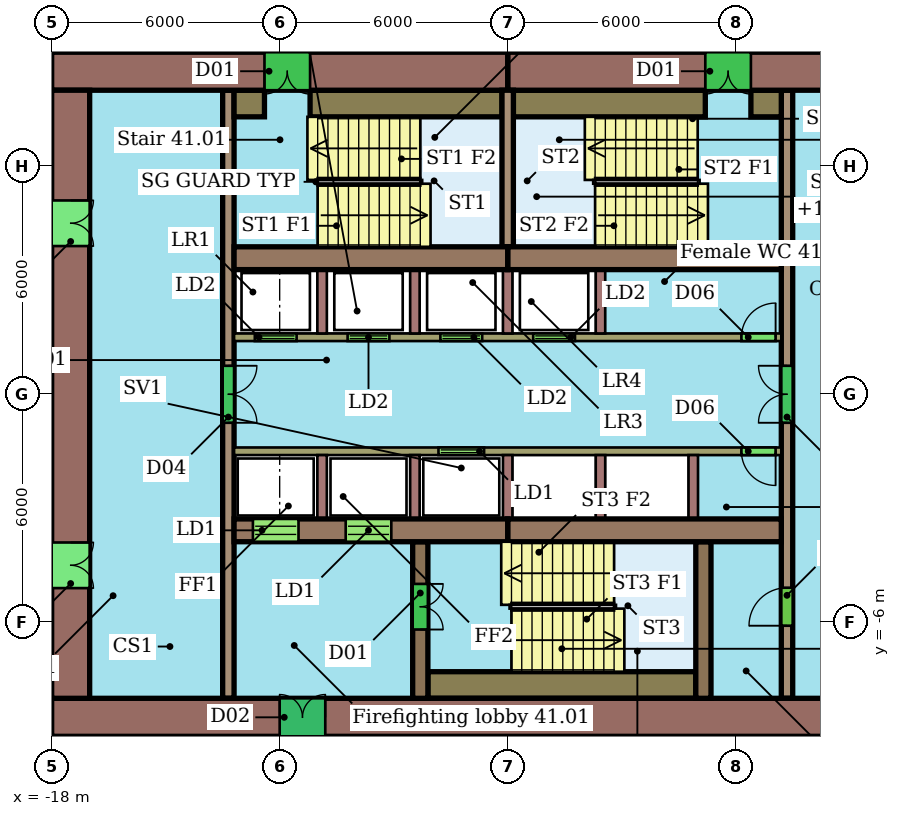
"""IFC4 building model, lengths in metres.
Left out: names, types, materials, properties, quantities, classifications, styles, units other than length and angle.
Written with IfcOpenShell. Run it as: python <this file> out.ifc"""

import sys

from ifc_helpers import new_model, si_unit, direction, frame, frame_2d, origin, place, context, subcontext, project, spatial, rectangle, extrude, element, fill, save


model = new_model("IFC4")
c1 = context("Model", 3, precision=1e-05, world=origin(), true_north=direction((0.0, 1.0)))
c2 = subcontext(c1, "Body", "Model", "MODEL_VIEW")
j1 = project(units=[si_unit("LENGTHUNIT", "METRE"), si_unit("PLANEANGLEUNIT", "RADIAN")], contexts=[c1])
p1 = place(None, origin())
s1 = spatial("IfcSite", under=j1, at=p1, CompositionType="ELEMENT")
p2 = place(p1, origin())
s2 = spatial("IfcBuilding", under=s1, at=p2, CompositionType="ELEMENT")
p3 = place(p2, frame((0.0, 0.0, 172.2)))
s3 = spatial("IfcBuildingStorey", under=s2, at=p3, CompositionType="ELEMENT", Elevation=172.2)
p4 = place(p3, frame((6.0, 8.5, 0.0), z_axis=(0.0, 0.0, 1.0), x_axis=(-1.0, 0.0, 0.0)))
e1 = element("IfcWall", 1, at=p4, inside=s3, PredefinedType="SHEAR", context=c2, shape_type="SweptSolid", body=[
    extrude(rectangle(XDim=12.0, YDim=1.0, at=frame_2d((6.0, 0.0))), origin(), (0.0, 0.0, 1.0), 3.3),
])
p5 = place(p4, frame((5.6, 0.0, 0.0)))
e2 = element("IfcOpeningElement", 2, at=p5, cuts=e1, PredefinedType="OPENING", context=c2, shape_type="SweptSolid", body=[
    extrude(rectangle(XDim=1.2, YDim=2.1, at=frame_2d((0.6, 1.05))), frame((0.0, 0.51, 0.0), z_axis=(0.0, -1.0, 0.0), x_axis=(1.0, 0.0, 0.0)), (0.0, 0.0, 1.0), 1.02),
])
p6 = place(p3, frame((-6.0, 8.5, 0.0), z_axis=(0.0, 0.0, 1.0), x_axis=(-1.0, 0.0, 0.0)))
e3 = element("IfcWall", 3, at=p6, inside=s3, PredefinedType="SHEAR", context=c2, shape_type="SweptSolid", body=[
    extrude(rectangle(XDim=12.0, YDim=1.0, at=frame_2d((6.0, 0.0))), origin(), (0.0, 0.0, 1.0), 3.3),
])
p7 = place(p6, frame((5.2, 0.0, 0.0)))
e4 = element("IfcOpeningElement", 4, at=p7, cuts=e3, PredefinedType="OPENING", context=c2, shape_type="SweptSolid", body=[
    extrude(rectangle(XDim=1.2, YDim=2.1, at=frame_2d((0.6, 1.05))), frame((0.0, 0.51, 0.0), z_axis=(0.0, -1.0, 0.0), x_axis=(1.0, 0.0, 0.0)), (0.0, 0.0, 1.0), 1.02),
])
p8 = place(p3, frame((-18.0, -8.5, 0.0), z_axis=(0.0, 0.0, 1.0), x_axis=(1.0, 0.0, 0.0)))
e5 = element("IfcWall", 5, at=p8, inside=s3, PredefinedType="SHEAR", context=c2, shape_type="SweptSolid", body=[
    extrude(rectangle(XDim=24.0, YDim=1.0, at=frame_2d((12.0, 0.0))), origin(), (0.0, 0.0, 1.0), 3.3),
])
p9 = place(p8, frame((6.0, 0.0, 0.0)))
e6 = element("IfcOpeningElement", 6, at=p9, cuts=e5, PredefinedType="OPENING", context=c2, shape_type="SweptSolid", body=[
    extrude(rectangle(XDim=1.2, YDim=2.1, at=frame_2d((0.6, 1.05))), frame((0.0, 0.51, 0.0), z_axis=(0.0, -1.0, 0.0), x_axis=(1.0, 0.0, 0.0)), (0.0, 0.0, 1.0), 1.02),
])
p10 = place(p3, frame((-17.5, 8.0, 0.0), z_axis=(0.0, 0.0, 1.0), x_axis=(0.0, -1.0, 0.0)))
e7 = element("IfcWall", 7, at=p10, inside=s3, PredefinedType="SHEAR", context=c2, shape_type="SweptSolid", body=[
    extrude(rectangle(XDim=16.0, YDim=1.0, at=frame_2d((8.0, 0.0))), origin(), (0.0, 0.0, 1.0), 3.3),
])
p11 = place(p10, frame((11.9, 0.0, 0.0)))
e8 = element("IfcOpeningElement", 8, at=p11, cuts=e7, PredefinedType="OPENING", context=c2, shape_type="SweptSolid", body=[
    extrude(rectangle(XDim=1.2, YDim=2.1, at=frame_2d((0.6, 1.05))), frame((0.0, 0.51, 0.0), z_axis=(0.0, -1.0, 0.0), x_axis=(1.0, 0.0, 0.0)), (0.0, 0.0, 1.0), 1.02),
])
p12 = place(p10, frame((2.9, 0.0, 0.0)))
e9 = element("IfcOpeningElement", 9, at=p12, cuts=e7, PredefinedType="OPENING", context=c2, shape_type="SweptSolid", body=[
    extrude(rectangle(XDim=1.2, YDim=2.1, at=frame_2d((0.6, 1.05))), frame((0.0, 0.51, 0.0), z_axis=(0.0, -1.0, 0.0), x_axis=(1.0, 0.0, 0.0)), (0.0, 0.0, 1.0), 1.02),
])
for number, where, z_axis, x_axis in (
    (10, (-13.2, 3.58, 0.0), (0.0, 0.0, 1.0), (1.0, 0.0, 0.0)),
    (11, (-6.0, 3.58, 0.0), (0.0, 0.0, 1.0), (1.0, 0.0, 0.0)),
):
    element("IfcWall", number, at=place(p3, frame(where, z_axis=z_axis, x_axis=x_axis)), inside=s3, PredefinedType="SHEAR", context=c2, shape_type="SweptSolid", body=[
        extrude(rectangle(XDim=7.2, YDim=0.6, at=frame_2d((3.6, 0.0))), origin(), (0.0, 0.0, 1.0), 3.3),
    ])
p13 = place(p3, frame((-13.2, -3.58, 0.0), z_axis=(0.0, 0.0, 1.0), x_axis=(1.0, 0.0, 0.0)))
e12 = element("IfcWall", 12, at=p13, inside=s3, PredefinedType="SHEAR", context=c2, shape_type="SweptSolid", body=[
    extrude(rectangle(XDim=7.2, YDim=0.6, at=frame_2d((3.6, 0.0))), origin(), (0.0, 0.0, 1.0), 3.3),
])
p14 = place(p13, frame((0.496, 0.0, 0.0)))
e13 = element("IfcOpeningElement", 13, at=p14, cuts=e12, PredefinedType="OPENING", context=c2, shape_type="SweptSolid", body=[
    extrude(rectangle(XDim=1.2, YDim=2.1, at=frame_2d((0.6, 1.05))), frame((0.0, 0.31, 0.0), z_axis=(0.0, -1.0, 0.0), x_axis=(1.0, 0.0, 0.0)), (0.0, 0.0, 1.0), 0.62),
])
p15 = place(p13, frame((2.938, 0.0, 0.0)))
e14 = element("IfcOpeningElement", 14, at=p15, cuts=e12, PredefinedType="OPENING", context=c2, shape_type="SweptSolid", body=[
    extrude(rectangle(XDim=1.2, YDim=2.1, at=frame_2d((0.6, 1.05))), frame((0.0, 0.31, 0.0), z_axis=(0.0, -1.0, 0.0), x_axis=(1.0, 0.0, 0.0)), (0.0, 0.0, 1.0), 0.62),
])
p16 = place(p3, frame((-6.0, -3.58, 0.0), z_axis=(0.0, 0.0, 1.0), x_axis=(1.0, 0.0, 0.0)))
e15 = element("IfcWall", 15, at=p16, inside=s3, PredefinedType="SHEAR", context=c2, shape_type="SweptSolid", body=[
    extrude(rectangle(XDim=7.2, YDim=0.6, at=frame_2d((3.6, 0.0))), origin(), (0.0, 0.0, 1.0), 3.3),
])
p17 = place(p3, frame((-13.35, 8.0, 0.0), z_axis=(0.0, 0.0, 1.0), x_axis=(0.0, -1.0, 0.0)))
e16 = element("IfcWall", 16, at=p17, inside=s3, PredefinedType="SHEAR", context=c2, shape_type="SweptSolid", body=[
    extrude(rectangle(XDim=16.0, YDim=0.3, at=frame_2d((8.0, 0.0))), origin(), (0.0, 0.0, 1.0), 3.3),
])
p18 = place(p17, frame((7.25, 0.0, 0.0)))
e17 = element("IfcOpeningElement", 17, at=p18, cuts=e16, PredefinedType="OPENING", context=c2, shape_type="SweptSolid", body=[
    extrude(rectangle(XDim=1.5, YDim=2.1, at=frame_2d((0.75, 1.05))), frame((0.0, 0.16, 0.0), z_axis=(0.0, -1.0, 0.0), x_axis=(1.0, 0.0, 0.0)), (0.0, 0.0, 1.0), 0.32),
])
p19 = place(p3, frame((1.35, -8.0, 0.0), z_axis=(0.0, 0.0, 1.0), x_axis=(0.0, 1.0, 0.0)))
e18 = element("IfcWall", 18, at=p19, inside=s3, PredefinedType="SHEAR", context=c2, shape_type="SweptSolid", body=[
    extrude(rectangle(XDim=16.0, YDim=0.3, at=frame_2d((8.0, 0.0))), origin(), (0.0, 0.0, 1.0), 3.3),
])
p20 = place(p19, frame((1.91, 0.0, 0.0)))
e19 = element("IfcOpeningElement", 19, at=p20, cuts=e18, PredefinedType="OPENING", context=c2, shape_type="SweptSolid", body=[
    extrude(rectangle(XDim=1.0, YDim=2.1, at=frame_2d((0.5, 1.05))), frame((0.0, 0.16, 0.0), z_axis=(0.0, -1.0, 0.0), x_axis=(1.0, 0.0, 0.0)), (0.0, 0.0, 1.0), 0.32),
])
p21 = place(p19, frame((7.25, 0.0, 0.0)))
e20 = element("IfcOpeningElement", 20, at=p21, cuts=e18, PredefinedType="OPENING", context=c2, shape_type="SweptSolid", body=[
    extrude(rectangle(XDim=1.5, YDim=2.1, at=frame_2d((0.75, 1.05))), frame((0.0, 0.16, 0.0), z_axis=(0.0, -1.0, 0.0), x_axis=(1.0, 0.0, 0.0)), (0.0, 0.0, 1.0), 0.32),
])
p22 = place(p3, frame((-13.2, 1.5, 0.0), z_axis=(0.0, 0.0, 1.0), x_axis=(1.0, 0.0, 0.0)))
e21 = element("IfcWall", 21, at=p22, inside=s3, PredefinedType="SHEAR", context=c2, shape_type="SweptSolid", body=[
    extrude(rectangle(XDim=14.4, YDim=0.2, at=frame_2d((7.2, 0.0))), origin(), (0.0, 0.0, 1.0), 3.3),
])
p23 = place(p22, frame((0.546, 0.0, 0.0)))
e22 = element("IfcOpeningElement", 22, at=p23, cuts=e21, PredefinedType="OPENING", context=c2, shape_type="SweptSolid", body=[
    extrude(rectangle(XDim=1.1, YDim=2.1, at=frame_2d((0.55, 1.05))), frame((0.0, 0.11, 0.0), z_axis=(0.0, -1.0, 0.0), x_axis=(1.0, 0.0, 0.0)), (0.0, 0.0, 1.0), 0.22),
])
p24 = place(p22, frame((2.988, 0.0, 0.0)))
e23 = element("IfcOpeningElement", 23, at=p24, cuts=e21, PredefinedType="OPENING", context=c2, shape_type="SweptSolid", body=[
    extrude(rectangle(XDim=1.1, YDim=2.1, at=frame_2d((0.55, 1.05))), frame((0.0, 0.11, 0.0), z_axis=(0.0, -1.0, 0.0), x_axis=(1.0, 0.0, 0.0)), (0.0, 0.0, 1.0), 0.22),
])
p25 = place(p22, frame((5.429, 0.0, 0.0)))
e24 = element("IfcOpeningElement", 24, at=p25, cuts=e21, PredefinedType="OPENING", context=c2, shape_type="SweptSolid", body=[
    extrude(rectangle(XDim=1.1, YDim=2.1, at=frame_2d((0.55, 1.05))), frame((0.0, 0.11, 0.0), z_axis=(0.0, -1.0, 0.0), x_axis=(1.0, 0.0, 0.0)), (0.0, 0.0, 1.0), 0.22),
])
p26 = place(p22, frame((7.871, 0.0, 0.0)))
e25 = element("IfcOpeningElement", 25, at=p26, cuts=e21, PredefinedType="OPENING", context=c2, shape_type="SweptSolid", body=[
    extrude(rectangle(XDim=1.1, YDim=2.1, at=frame_2d((0.55, 1.05))), frame((0.0, 0.11, 0.0), z_axis=(0.0, -1.0, 0.0), x_axis=(1.0, 0.0, 0.0)), (0.0, 0.0, 1.0), 0.22),
])
p27 = place(p22, frame((13.35, 0.0, 0.0)))
e26 = element("IfcOpeningElement", 26, at=p27, cuts=e21, PredefinedType="OPENING", context=c2, shape_type="SweptSolid", body=[
    extrude(rectangle(XDim=0.9, YDim=2.1, at=frame_2d((0.45, 1.05))), frame((0.0, 0.11, 0.0), z_axis=(0.0, -1.0, 0.0), x_axis=(1.0, 0.0, 0.0)), (0.0, 0.0, 1.0), 0.22),
])
p28 = place(p3, frame((1.2, -1.5, 0.0), z_axis=(0.0, 0.0, 1.0), x_axis=(-1.0, 0.0, 0.0)))
e27 = element("IfcWall", 27, at=p28, inside=s3, PredefinedType="SHEAR", context=c2, shape_type="SweptSolid", body=[
    extrude(rectangle(XDim=14.4, YDim=0.2, at=frame_2d((7.2, 0.0))), origin(), (0.0, 0.0, 1.0), 3.3),
])
p29 = place(p28, frame((7.821, 0.0, 0.0)))
e28 = element("IfcOpeningElement", 28, at=p29, cuts=e27, PredefinedType="OPENING", context=c2, shape_type="SweptSolid", body=[
    extrude(rectangle(XDim=1.2, YDim=2.1, at=frame_2d((0.6, 1.05))), frame((0.0, 0.11, 0.0), z_axis=(0.0, -1.0, 0.0), x_axis=(1.0, 0.0, 0.0)), (0.0, 0.0, 1.0), 0.22),
])
p30 = place(p28, frame((0.15, 0.0, 0.0)))
e29 = element("IfcOpeningElement", 29, at=p30, cuts=e27, PredefinedType="OPENING", context=c2, shape_type="SweptSolid", body=[
    extrude(rectangle(XDim=0.9, YDim=2.1, at=frame_2d((0.45, 1.05))), frame((0.0, 0.11, 0.0), z_axis=(0.0, -1.0, 0.0), x_axis=(1.0, 0.0, 0.0)), (0.0, 0.0, 1.0), 0.22),
])
p31 = place(p3, frame((-8.3, -3.88, 0.0), z_axis=(0.0, 0.0, 1.0), x_axis=(0.0, -1.0, 0.0)))
e30 = element("IfcWall", 30, at=p31, inside=s3, PredefinedType="SHEAR", context=c2, shape_type="SweptSolid", body=[
    extrude(rectangle(XDim=4.12, YDim=0.4, at=frame_2d((2.06, 0.0))), origin(), (0.0, 0.0, 1.0), 3.3),
])
p32 = place(p31, frame((1.11, 0.0, 0.0)))
e31 = element("IfcOpeningElement", 31, at=p32, cuts=e30, PredefinedType="OPENING", context=c2, shape_type="SweptSolid", body=[
    extrude(rectangle(XDim=1.2, YDim=2.1, at=frame_2d((0.6, 1.05))), frame((0.0, 0.21, 0.0), z_axis=(0.0, -1.0, 0.0), x_axis=(1.0, 0.0, 0.0)), (0.0, 0.0, 1.0), 0.42),
])
p33 = place(p3, frame((-0.85, -3.88, 0.0), z_axis=(0.0, 0.0, 1.0), x_axis=(0.0, -1.0, 0.0)))
e32 = element("IfcWall", 32, at=p33, inside=s3, PredefinedType="SHEAR", context=c2, shape_type="SweptSolid", body=[
    extrude(rectangle(XDim=4.12, YDim=0.4, at=frame_2d((2.06, 0.0))), origin(), (0.0, 0.0, 1.0), 3.3),
])
p34 = place(p3, frame((-6.0, 3.88, 0.0), z_axis=(0.0, 0.0, 1.0), x_axis=(0.0, 1.0, 0.0)))
e33 = element("IfcWall", 33, at=p34, inside=s3, PredefinedType="SHEAR", context=c2, shape_type="SweptSolid", body=[
    extrude(rectangle(XDim=4.12, YDim=0.3, at=frame_2d((2.06, 0.0))), origin(), (0.0, 0.0, 1.0), 3.3),
])
p35 = place(p3, frame((-13.2, 7.65, 0.0), z_axis=(0.0, 0.0, 1.0), x_axis=(1.0, 0.0, 0.0)))
e34 = element("IfcWall", 34, at=p35, inside=s3, PredefinedType="SHEAR", context=c2, shape_type="SweptSolid", body=[
    extrude(rectangle(XDim=0.8, YDim=0.7, at=frame_2d((0.4, 0.0))), origin(), (0.0, 0.0, 1.0), 3.3),
])
for number, where, z_axis, x_axis in (
    (35, (-11.2, 7.65, 0.0), (0.0, 0.0, 1.0), (1.0, 0.0, 0.0)),
    (36, (-5.85, 7.65, 0.0), (0.0, 0.0, 1.0), (1.0, 0.0, 0.0)),
):
    element("IfcWall", number, at=place(p3, frame(where, z_axis=z_axis, x_axis=x_axis)), inside=s3, PredefinedType="SHEAR", context=c2, shape_type="SweptSolid", body=[
        extrude(rectangle(XDim=5.05, YDim=0.7, at=frame_2d((2.525, 0.0))), origin(), (0.0, 0.0, 1.0), 3.3),
    ])
p36 = place(p3, frame((0.4, 7.65, 0.0), z_axis=(0.0, 0.0, 1.0), x_axis=(1.0, 0.0, 0.0)))
e37 = element("IfcWall", 37, at=p36, inside=s3, PredefinedType="SHEAR", context=c2, shape_type="SweptSolid", body=[
    extrude(rectangle(XDim=0.8, YDim=0.7, at=frame_2d((0.4, 0.0))), origin(), (0.0, 0.0, 1.0), 3.3),
])
p37 = place(p3, frame((-8.1, -7.65, 0.0), z_axis=(0.0, 0.0, 1.0), x_axis=(1.0, 0.0, 0.0)))
e38 = element("IfcWall", 38, at=p37, inside=s3, PredefinedType="SHEAR", context=c2, shape_type="SweptSolid", body=[
    extrude(rectangle(XDim=7.05, YDim=0.7, at=frame_2d((3.525, 0.0))), origin(), (0.0, 0.0, 1.0), 3.3),
])
for number, where, z_axis, x_axis in (
    (39, (-10.883, 1.6, 0.0), (0.0, 0.0, 1.0), (0.0, 1.0, 0.0)),
    (40, (-8.442, 1.6, 0.0), (0.0, 0.0, 1.0), (0.0, 1.0, 0.0)),
    (41, (-6.0, 1.6, 0.0), (0.0, 0.0, 1.0), (0.0, 1.0, 0.0)),
    (42, (-3.558, 1.6, 0.0), (0.0, 0.0, 1.0), (0.0, 1.0, 0.0)),
    (43, (-10.883, -1.6, 0.0), (0.0, 0.0, 1.0), (0.0, -1.0, 0.0)),
    (44, (-8.442, -1.6, 0.0), (0.0, 0.0, 1.0), (0.0, -1.0, 0.0)),
    (45, (-6.0, -1.6, 0.0), (0.0, 0.0, 1.0), (0.0, -1.0, 0.0)),
    (46, (-3.558, -1.6, 0.0), (0.0, 0.0, 1.0), (0.0, -1.0, 0.0)),
    (47, (-1.117, -1.6, 0.0), (0.0, 0.0, 1.0), (0.0, -1.0, 0.0)),
):
    element("IfcWall", number, at=place(p3, frame(where, z_axis=z_axis, x_axis=x_axis)), inside=s3, PredefinedType="SHEAR", context=c2, shape_type="SweptSolid", body=[
        extrude(rectangle(XDim=1.68, YDim=0.25, at=frame_2d((0.84, 0.0))), origin(), (0.0, 0.0, 1.0), 3.3),
    ])
p38 = place(p5, origin())
e48 = element("IfcDoor", 48, at=p38, inside=s3, OperationType="DOUBLE_DOOR_SINGLE_SWING", PredefinedType="NOTDEFINED", context=c2, shape_type="SweptSolid", body=[
    extrude(rectangle(XDim=1.2, YDim=2.1, at=frame_2d((0.6, 1.05))), frame((0.0, 0.025, 0.0), z_axis=(0.0, -1.0, 0.0), x_axis=(1.0, 0.0, 0.0)), (0.0, 0.0, 1.0), 0.05),
])
fill(e2, e48)
p39 = place(p7, origin())
e49 = element("IfcDoor", 49, at=p39, inside=s3, OperationType="DOUBLE_DOOR_SINGLE_SWING", PredefinedType="NOTDEFINED", context=c2, shape_type="SweptSolid", body=[
    extrude(rectangle(XDim=1.2, YDim=2.1, at=frame_2d((0.6, 1.05))), frame((0.0, 0.025, 0.0), z_axis=(0.0, -1.0, 0.0), x_axis=(1.0, 0.0, 0.0)), (0.0, 0.0, 1.0), 0.05),
])
fill(e4, e49)
p40 = place(p9, origin())
e50 = element("IfcDoor", 50, at=p40, inside=s3, OperationType="DOUBLE_DOOR_SINGLE_SWING", PredefinedType="NOTDEFINED", context=c2, shape_type="SweptSolid", body=[
    extrude(rectangle(XDim=1.2, YDim=2.1, at=frame_2d((0.6, 1.05))), frame((0.0, 0.025, 0.0), z_axis=(0.0, -1.0, 0.0), x_axis=(1.0, 0.0, 0.0)), (0.0, 0.0, 1.0), 0.05),
])
fill(e6, e50)
p41 = place(p11, origin())
e51 = element("IfcDoor", 51, at=p41, inside=s3, OperationType="DOUBLE_DOOR_SINGLE_SWING", PredefinedType="NOTDEFINED", context=c2, shape_type="SweptSolid", body=[
    extrude(rectangle(XDim=1.2, YDim=2.1, at=frame_2d((0.6, 1.05))), frame((0.0, 0.025, 0.0), z_axis=(0.0, -1.0, 0.0), x_axis=(1.0, 0.0, 0.0)), (0.0, 0.0, 1.0), 0.05),
])
fill(e8, e51)
p42 = place(p12, origin())
e52 = element("IfcDoor", 52, at=p42, inside=s3, OperationType="DOUBLE_DOOR_SINGLE_SWING", PredefinedType="NOTDEFINED", context=c2, shape_type="SweptSolid", body=[
    extrude(rectangle(XDim=1.2, YDim=2.1, at=frame_2d((0.6, 1.05))), frame((0.0, 0.025, 0.0), z_axis=(0.0, -1.0, 0.0), x_axis=(1.0, 0.0, 0.0)), (0.0, 0.0, 1.0), 0.05),
])
fill(e9, e52)
p43 = place(p14, origin())
e53 = element("IfcDoor", 53, at=p43, inside=s3, OperationType="DOUBLE_DOOR_SLIDING", PredefinedType="NOTDEFINED", context=c2, shape_type="SweptSolid", body=[
    extrude(rectangle(XDim=1.2, YDim=2.1, at=frame_2d((0.6, 1.05))), frame((0.0, 0.025, 0.0), z_axis=(0.0, -1.0, 0.0), x_axis=(1.0, 0.0, 0.0)), (0.0, 0.0, 1.0), 0.05),
])
fill(e13, e53)
p44 = place(p15, origin())
e54 = element("IfcDoor", 54, at=p44, inside=s3, OperationType="DOUBLE_DOOR_SLIDING", PredefinedType="NOTDEFINED", context=c2, shape_type="SweptSolid", body=[
    extrude(rectangle(XDim=1.2, YDim=2.1, at=frame_2d((0.6, 1.05))), frame((0.0, 0.025, 0.0), z_axis=(0.0, -1.0, 0.0), x_axis=(1.0, 0.0, 0.0)), (0.0, 0.0, 1.0), 0.05),
])
fill(e14, e54)
p45 = place(p18, origin())
e55 = element("IfcDoor", 55, at=p45, inside=s3, OperationType="DOUBLE_DOOR_SINGLE_SWING", PredefinedType="NOTDEFINED", context=c2, shape_type="SweptSolid", body=[
    extrude(rectangle(XDim=1.5, YDim=2.1, at=frame_2d((0.75, 1.05))), frame((0.0, 0.025, 0.0), z_axis=(0.0, -1.0, 0.0), x_axis=(1.0, 0.0, 0.0)), (0.0, 0.0, 1.0), 0.05),
])
fill(e17, e55)
p46 = place(p20, origin())
e56 = element("IfcDoor", 56, at=p46, inside=s3, OperationType="SINGLE_SWING_LEFT", PredefinedType="NOTDEFINED", context=c2, shape_type="SweptSolid", body=[
    extrude(rectangle(XDim=1.0, YDim=2.1, at=frame_2d((0.5, 1.05))), frame((0.0, 0.025, 0.0), z_axis=(0.0, -1.0, 0.0), x_axis=(1.0, 0.0, 0.0)), (0.0, 0.0, 1.0), 0.05),
])
fill(e19, e56)
p47 = place(p21, origin())
e57 = element("IfcDoor", 57, at=p47, inside=s3, OperationType="DOUBLE_DOOR_SINGLE_SWING", PredefinedType="NOTDEFINED", context=c2, shape_type="SweptSolid", body=[
    extrude(rectangle(XDim=1.5, YDim=2.1, at=frame_2d((0.75, 1.05))), frame((0.0, 0.025, 0.0), z_axis=(0.0, -1.0, 0.0), x_axis=(1.0, 0.0, 0.0)), (0.0, 0.0, 1.0), 0.05),
])
fill(e20, e57)
p48 = place(p23, origin())
e58 = element("IfcDoor", 58, at=p48, inside=s3, OperationType="DOUBLE_DOOR_SLIDING", PredefinedType="NOTDEFINED", context=c2, shape_type="SweptSolid", body=[
    extrude(rectangle(XDim=1.1, YDim=2.1, at=frame_2d((0.55, 1.05))), frame((0.0, 0.025, 0.0), z_axis=(0.0, -1.0, 0.0), x_axis=(1.0, 0.0, 0.0)), (0.0, 0.0, 1.0), 0.05),
])
fill(e22, e58)
p49 = place(p24, origin())
e59 = element("IfcDoor", 59, at=p49, inside=s3, OperationType="DOUBLE_DOOR_SLIDING", PredefinedType="NOTDEFINED", context=c2, shape_type="SweptSolid", body=[
    extrude(rectangle(XDim=1.1, YDim=2.1, at=frame_2d((0.55, 1.05))), frame((0.0, 0.025, 0.0), z_axis=(0.0, -1.0, 0.0), x_axis=(1.0, 0.0, 0.0)), (0.0, 0.0, 1.0), 0.05),
])
fill(e23, e59)
p50 = place(p25, origin())
e60 = element("IfcDoor", 60, at=p50, inside=s3, OperationType="DOUBLE_DOOR_SLIDING", PredefinedType="NOTDEFINED", context=c2, shape_type="SweptSolid", body=[
    extrude(rectangle(XDim=1.1, YDim=2.1, at=frame_2d((0.55, 1.05))), frame((0.0, 0.025, 0.0), z_axis=(0.0, -1.0, 0.0), x_axis=(1.0, 0.0, 0.0)), (0.0, 0.0, 1.0), 0.05),
])
fill(e24, e60)
p51 = place(p26, origin())
e61 = element("IfcDoor", 61, at=p51, inside=s3, OperationType="DOUBLE_DOOR_SLIDING", PredefinedType="NOTDEFINED", context=c2, shape_type="SweptSolid", body=[
    extrude(rectangle(XDim=1.1, YDim=2.1, at=frame_2d((0.55, 1.05))), frame((0.0, 0.025, 0.0), z_axis=(0.0, -1.0, 0.0), x_axis=(1.0, 0.0, 0.0)), (0.0, 0.0, 1.0), 0.05),
])
fill(e25, e61)
p52 = place(p27, origin())
e62 = element("IfcDoor", 62, at=p52, inside=s3, OperationType="SINGLE_SWING_RIGHT", PredefinedType="NOTDEFINED", context=c2, shape_type="SweptSolid", body=[
    extrude(rectangle(XDim=0.9, YDim=2.1, at=frame_2d((0.45, 1.05))), frame((0.0, 0.025, 0.0), z_axis=(0.0, -1.0, 0.0), x_axis=(1.0, 0.0, 0.0)), (0.0, 0.0, 1.0), 0.05),
])
fill(e26, e62)
p53 = place(p29, origin())
e63 = element("IfcDoor", 63, at=p53, inside=s3, OperationType="DOUBLE_DOOR_SLIDING", PredefinedType="NOTDEFINED", context=c2, shape_type="SweptSolid", body=[
    extrude(rectangle(XDim=1.2, YDim=2.1, at=frame_2d((0.6, 1.05))), frame((0.0, 0.025, 0.0), z_axis=(0.0, -1.0, 0.0), x_axis=(1.0, 0.0, 0.0)), (0.0, 0.0, 1.0), 0.05),
])
fill(e28, e63)
p54 = place(p30, origin())
e64 = element("IfcDoor", 64, at=p54, inside=s3, OperationType="SINGLE_SWING_LEFT", PredefinedType="NOTDEFINED", context=c2, shape_type="SweptSolid", body=[
    extrude(rectangle(XDim=0.9, YDim=2.1, at=frame_2d((0.45, 1.05))), frame((0.0, 0.025, 0.0), z_axis=(0.0, -1.0, 0.0), x_axis=(1.0, 0.0, 0.0)), (0.0, 0.0, 1.0), 0.05),
])
fill(e29, e64)
p55 = place(p32, origin())
e65 = element("IfcDoor", 65, at=p55, inside=s3, OperationType="DOUBLE_DOOR_SINGLE_SWING", PredefinedType="NOTDEFINED", context=c2, shape_type="SweptSolid", body=[
    extrude(rectangle(XDim=1.2, YDim=2.1, at=frame_2d((0.6, 1.05))), frame((0.0, 0.025, 0.0), z_axis=(0.0, -1.0, 0.0), x_axis=(1.0, 0.0, 0.0)), (0.0, 0.0, 1.0), 0.05),
])
fill(e31, e65)
save(model, sys.argv[1])
